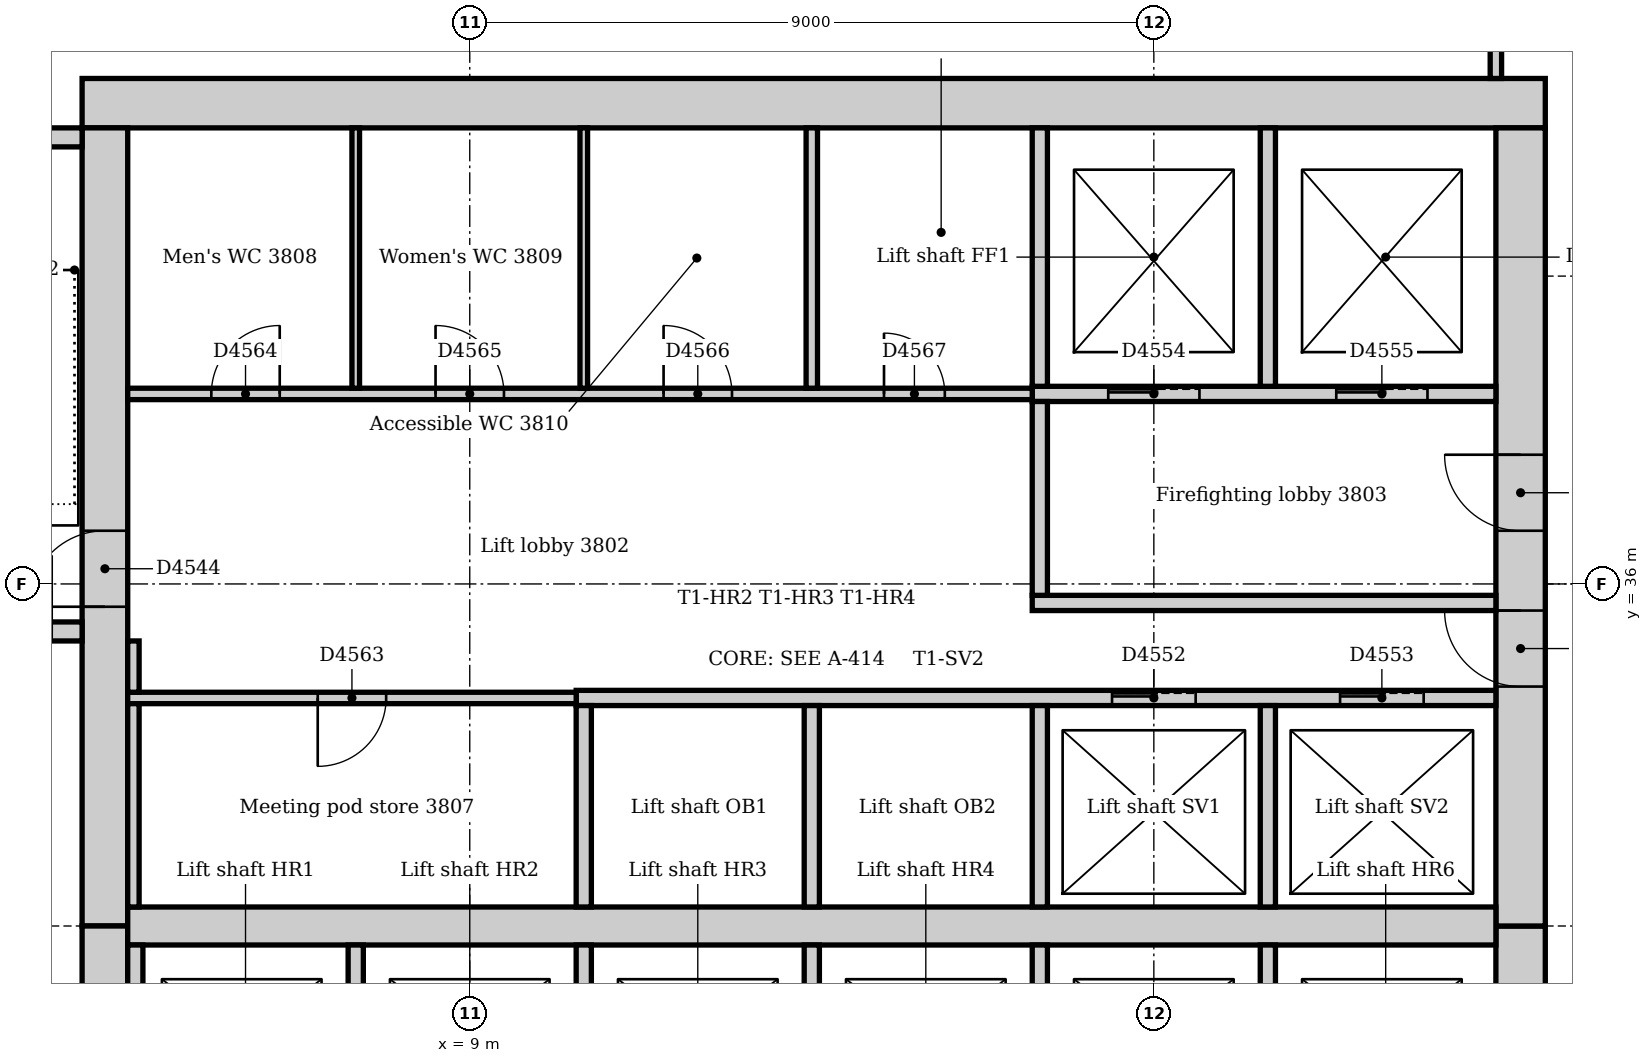
"""IFC4 building model, lengths in metres.
Left out: names, types, materials, properties, quantities, classifications, styles, units other than length and angle.
Written with IfcOpenShell. Run it as: python <this file> out.ifc"""

import sys

from ifc_helpers import new_model, si_unit, direction, frame, frame_2d, origin, place, context, subcontext, project, spatial, rectangle, extrude, element, fill, save


model = new_model("IFC4")
c1 = context("Model", 3, precision=1e-05, world=origin(), true_north=direction((0.0, 1.0)))
c2 = subcontext(c1, "Body", "Model", "MODEL_VIEW")
j1 = project(units=[si_unit("LENGTHUNIT", "METRE"), si_unit("PLANEANGLEUNIT", "RADIAN")], contexts=[c1])
p1 = place(None, origin())
s1 = spatial("IfcSite", under=j1, at=p1, CompositionType="ELEMENT")
p2 = place(p1, origin())
s2 = spatial("IfcBuilding", under=s1, at=p2, CompositionType="ELEMENT")
p3 = place(p2, frame((0.0, 0.0, 161.0)))
s3 = spatial("IfcBuildingStorey", under=s2, at=p3, CompositionType="ELEMENT", Elevation=161.0)
p4 = place(p3, frame((23.15, 42.325, 0.0), z_axis=(0.0, 0.0, 1.0), x_axis=(-1.0, 0.0, 0.0)))
e1 = element("IfcWall", 1, at=p4, inside=s3, PredefinedType="SOLIDWALL", context=c2, shape_type="SweptSolid", body=[
    extrude(rectangle(XDim=19.25, YDim=0.65, at=frame_2d((9.625, 0.0))), origin(), (0.0, 0.0, 1.0), 4.0),
])
p5 = place(p3, frame((22.825, 21.0, 0.0), z_axis=(0.0, 0.0, 1.0), x_axis=(0.0, 1.0, 0.0)))
e2 = element("IfcWall", 2, at=p5, inside=s3, PredefinedType="SOLIDWALL", context=c2, shape_type="SweptSolid", body=[
    extrude(rectangle(XDim=10.5, YDim=0.65, at=frame_2d((5.25, 0.0))), origin(), (0.0, 0.0, 1.0), 4.0),
])
p6 = place(p5, frame((4.35, 0.0, 0.0)))
e3 = element("IfcOpeningElement", 3, at=p6, cuts=e2, PredefinedType="OPENING", context=c2, shape_type="SweptSolid", body=[
    extrude(rectangle(XDim=1.8, YDim=2.1, at=frame_2d((0.9, 1.05))), frame((0.0, 0.335, 0.0), z_axis=(0.0, -1.0, 0.0), x_axis=(1.0, 0.0, 0.0)), (0.0, 0.0, 1.0), 0.67),
])
p7 = place(p3, frame((22.825, 31.5, 0.0), z_axis=(0.0, 0.0, 1.0), x_axis=(0.0, 1.0, 0.0)))
e4 = element("IfcWall", 4, at=p7, inside=s3, PredefinedType="SOLIDWALL", context=c2, shape_type="SweptSolid", body=[
    extrude(rectangle(XDim=10.5, YDim=0.65, at=frame_2d((5.25, 0.0))), origin(), (0.0, 0.0, 1.0), 4.0),
])
p8 = place(p7, frame((3.15, 0.0, 0.0)))
e5 = element("IfcOpeningElement", 5, at=p8, cuts=e4, PredefinedType="OPENING", context=c2, shape_type="SweptSolid", body=[
    extrude(rectangle(XDim=1.0, YDim=2.1, at=frame_2d((0.5, 1.05))), frame((0.0, 0.335, 0.0), z_axis=(0.0, -1.0, 0.0), x_axis=(1.0, 0.0, 0.0)), (0.0, 0.0, 1.0), 0.67),
])
p9 = place(p7, frame((5.2, 0.0, 0.0)))
e6 = element("IfcOpeningElement", 6, at=p9, cuts=e4, PredefinedType="OPENING", context=c2, shape_type="SweptSolid", body=[
    extrude(rectangle(XDim=1.0, YDim=2.1, at=frame_2d((0.5, 1.05))), frame((0.0, 0.335, 0.0), z_axis=(0.0, -1.0, 0.0), x_axis=(1.0, 0.0, 0.0)), (0.0, 0.0, 1.0), 0.67),
])
p10 = place(p3, frame((4.2, 42.0, 0.0), z_axis=(0.0, 0.0, 1.0), x_axis=(0.0, -1.0, 0.0)))
e7 = element("IfcWall", 7, at=p10, inside=s3, PredefinedType="SOLIDWALL", context=c2, shape_type="SweptSolid", body=[
    extrude(rectangle(XDim=10.5, YDim=0.6, at=frame_2d((5.25, 0.0))), origin(), (0.0, 0.0, 1.0), 4.0),
])
p11 = place(p10, frame((5.3, 0.0, 0.0)))
e8 = element("IfcOpeningElement", 8, at=p11, cuts=e7, PredefinedType="OPENING", context=c2, shape_type="SweptSolid", body=[
    extrude(rectangle(XDim=1.0, YDim=2.1, at=frame_2d((0.5, 1.05))), frame((0.0, 0.31, 0.0), z_axis=(0.0, -1.0, 0.0), x_axis=(1.0, 0.0, 0.0)), (0.0, 0.0, 1.0), 0.62),
])
p12 = place(p3, frame((4.2, 31.5, 0.0), z_axis=(0.0, 0.0, 1.0), x_axis=(0.0, -1.0, 0.0)))
e9 = element("IfcWall", 9, at=p12, inside=s3, PredefinedType="SOLIDWALL", context=c2, shape_type="SweptSolid", body=[
    extrude(rectangle(XDim=10.5, YDim=0.6, at=frame_2d((5.25, 0.0))), origin(), (0.0, 0.0, 1.0), 4.0),
])
p13 = place(p12, frame((4.25, 0.0, 0.0)))
e10 = element("IfcOpeningElement", 10, at=p13, cuts=e9, PredefinedType="OPENING", context=c2, shape_type="SweptSolid", body=[
    extrude(rectangle(XDim=1.0, YDim=2.1, at=frame_2d((0.5, 1.05))), frame((0.0, 0.31, 0.0), z_axis=(0.0, -1.0, 0.0), x_axis=(1.0, 0.0, 0.0)), (0.0, 0.0, 1.0), 0.62),
])
p14 = place(p3, frame((4.5, 31.5, 0.0), z_axis=(0.0, 0.0, 1.0), x_axis=(1.0, 0.0, 0.0)))
e11 = element("IfcWall", 11, at=p14, inside=s3, PredefinedType="SOLIDWALL", context=c2, shape_type="SweptSolid", body=[
    extrude(rectangle(XDim=18.0, YDim=0.5, at=frame_2d((9.0, 0.0))), origin(), (0.0, 0.0, 1.0), 4.0),
])
p15 = place(p3, frame((0.36, 35.375, 0.0), z_axis=(0.0, 0.0, 1.0), x_axis=(1.0, 0.0, 0.0)))
e12 = element("IfcWall", 12, at=p15, inside=s3, PredefinedType="SOLIDWALL", context=c2, shape_type="SweptSolid", body=[
    extrude(rectangle(XDim=3.54, YDim=0.25, at=frame_2d((1.77, 0.0))), origin(), (0.0, 0.0, 1.0), 4.0),
])
p16 = place(p15, frame((2.14, 0.0, 0.0)))
e13 = element("IfcOpeningElement", 13, at=p16, cuts=e12, PredefinedType="OPENING", context=c2, shape_type="SweptSolid", body=[
    extrude(rectangle(XDim=1.0, YDim=2.1, at=frame_2d((0.5, 1.05))), frame((0.0, 0.135, 0.0), z_axis=(0.0, -1.0, 0.0), x_axis=(1.0, 0.0, 0.0)), (0.0, 0.0, 1.0), 0.27),
])
p17 = place(p3, frame((3.9, 41.875, 0.0), z_axis=(0.0, 0.0, 1.0), x_axis=(-1.0, 0.0, 0.0)))
e14 = element("IfcWall", 14, at=p17, inside=s3, PredefinedType="SOLIDWALL", context=c2, shape_type="SweptSolid", body=[
    extrude(rectangle(XDim=3.54, YDim=0.25, at=frame_2d((1.77, 0.0))), origin(), (0.0, 0.0, 1.0), 4.0),
])
p18 = place(p3, frame((16.4, 35.75, 0.0), z_axis=(0.0, 0.0, 1.0), x_axis=(1.0, 0.0, 0.0)))
e15 = element("IfcWall", 15, at=p18, inside=s3, PredefinedType="PARTITIONING", context=c2, shape_type="SweptSolid", body=[
    extrude(rectangle(XDim=6.1, YDim=0.2, at=frame_2d((3.05, 0.0))), origin(), (0.0, 0.0, 1.0), 3.85),
])
p19 = place(p3, frame((16.4, 38.5, 0.0), z_axis=(0.0, 0.0, 1.0), x_axis=(1.0, 0.0, 0.0)))
e16 = element("IfcWall", 16, at=p19, inside=s3, PredefinedType="PARTITIONING", context=c2, shape_type="SweptSolid", body=[
    extrude(rectangle(XDim=6.1, YDim=0.2, at=frame_2d((3.05, 0.0))), origin(), (0.0, 0.0, 1.0), 3.85),
])
p20 = place(p19, frame((1.0, 0.0, 0.0)))
e17 = element("IfcOpeningElement", 17, at=p20, cuts=e16, PredefinedType="OPENING", context=c2, shape_type="SweptSolid", body=[
    extrude(rectangle(XDim=1.2, YDim=2.1, at=frame_2d((0.6, 1.05))), frame((0.0, 0.11, 0.0), z_axis=(0.0, -1.0, 0.0), x_axis=(1.0, 0.0, 0.0)), (0.0, 0.0, 1.0), 0.22),
])
p21 = place(p19, frame((4.0, 0.0, 0.0)))
e18 = element("IfcOpeningElement", 18, at=p21, cuts=e16, PredefinedType="OPENING", context=c2, shape_type="SweptSolid", body=[
    extrude(rectangle(XDim=1.2, YDim=2.1, at=frame_2d((0.6, 1.05))), frame((0.0, 0.11, 0.0), z_axis=(0.0, -1.0, 0.0), x_axis=(1.0, 0.0, 0.0)), (0.0, 0.0, 1.0), 0.22),
])
p22 = place(p3, frame((16.5, 35.85, 0.0), z_axis=(0.0, 0.0, 1.0), x_axis=(0.0, 1.0, 0.0)))
e19 = element("IfcWall", 19, at=p22, inside=s3, PredefinedType="PARTITIONING", context=c2, shape_type="SweptSolid", body=[
    extrude(rectangle(XDim=2.55, YDim=0.2, at=frame_2d((1.275, 0.0))), origin(), (0.0, 0.0, 1.0), 3.85),
])
p23 = place(p3, frame((10.4, 34.5, 0.0), z_axis=(0.0, 0.0, 1.0), x_axis=(1.0, 0.0, 0.0)))
e20 = element("IfcWall", 20, at=p23, inside=s3, PredefinedType="PARTITIONING", context=c2, shape_type="SweptSolid", body=[
    extrude(rectangle(XDim=12.1, YDim=0.2, at=frame_2d((6.05, 0.0))), origin(), (0.0, 0.0, 1.0), 3.85),
])
p24 = place(p23, frame((7.05, 0.0, 0.0)))
e21 = element("IfcOpeningElement", 21, at=p24, cuts=e20, PredefinedType="OPENING", context=c2, shape_type="SweptSolid", body=[
    extrude(rectangle(XDim=1.1, YDim=2.1, at=frame_2d((0.55, 1.05))), frame((0.0, 0.11, 0.0), z_axis=(0.0, -1.0, 0.0), x_axis=(1.0, 0.0, 0.0)), (0.0, 0.0, 1.0), 0.22),
])
p25 = place(p23, frame((10.05, 0.0, 0.0)))
e22 = element("IfcOpeningElement", 22, at=p25, cuts=e20, PredefinedType="OPENING", context=c2, shape_type="SweptSolid", body=[
    extrude(rectangle(XDim=1.1, YDim=2.1, at=frame_2d((0.55, 1.05))), frame((0.0, 0.11, 0.0), z_axis=(0.0, -1.0, 0.0), x_axis=(1.0, 0.0, 0.0)), (0.0, 0.0, 1.0), 0.22),
])
for number, where, z_axis, x_axis in (
    (23, (10.5, 28.6, 0.0), (0.0, 0.0, 1.0), (0.0, 1.0, 0.0)),
    (24, (10.5, 31.75, 0.0), (0.0, 0.0, 1.0), (0.0, 1.0, 0.0)),
    (25, (13.5, 28.6, 0.0), (0.0, 0.0, 1.0), (0.0, 1.0, 0.0)),
    (26, (13.5, 31.75, 0.0), (0.0, 0.0, 1.0), (0.0, 1.0, 0.0)),
    (27, (16.5, 28.6, 0.0), (0.0, 0.0, 1.0), (0.0, 1.0, 0.0)),
    (28, (16.5, 31.75, 0.0), (0.0, 0.0, 1.0), (0.0, 1.0, 0.0)),
    (29, (19.5, 28.6, 0.0), (0.0, 0.0, 1.0), (0.0, 1.0, 0.0)),
    (30, (19.5, 31.75, 0.0), (0.0, 0.0, 1.0), (0.0, 1.0, 0.0)),
):
    element("IfcWall", number, at=place(p3, frame(where, z_axis=z_axis, x_axis=x_axis)), inside=s3, PredefinedType="PARTITIONING", context=c2, shape_type="SweptSolid", body=[
        extrude(rectangle(XDim=2.65, YDim=0.2, at=frame_2d((1.325, 0.0))), origin(), (0.0, 0.0, 1.0), 3.85),
    ])
for number, where, z_axis, x_axis in (
    (31, (16.5, 38.6, 0.0), (0.0, 0.0, 1.0), (0.0, 1.0, 0.0)),
    (32, (19.5, 38.6, 0.0), (0.0, 0.0, 1.0), (0.0, 1.0, 0.0)),
):
    element("IfcWall", number, at=place(p3, frame(where, z_axis=z_axis, x_axis=x_axis)), inside=s3, PredefinedType="PARTITIONING", context=c2, shape_type="SweptSolid", body=[
        extrude(rectangle(XDim=3.4, YDim=0.2, at=frame_2d((1.7, 0.0))), origin(), (0.0, 0.0, 1.0), 3.85),
    ])
for number, where, z_axis, x_axis in (
    (33, (4.6, 28.6, 0.0), (0.0, 0.0, 1.0), (0.0, 1.0, 0.0)),
    (34, (7.5, 28.6, 0.0), (0.0, 0.0, 1.0), (0.0, 1.0, 0.0)),
):
    element("IfcWall", number, at=place(p3, frame(where, z_axis=z_axis, x_axis=x_axis)), inside=s3, PredefinedType="PARTITIONING", context=c2, shape_type="SweptSolid", body=[
        extrude(rectangle(XDim=2.65, YDim=0.2, at=frame_2d((1.325, 0.0))), origin(), (0.0, 0.0, 1.0), 3.85),
    ])
p26 = place(p3, frame((4.5, 38.5, 0.0), z_axis=(0.0, 0.0, 1.0), x_axis=(1.0, 0.0, 0.0)))
e35 = element("IfcWall", 35, at=p26, inside=s3, PredefinedType="PARTITIONING", context=c2, shape_type="SweptSolid", body=[
    extrude(rectangle(XDim=11.9, YDim=0.15, at=frame_2d((5.95, 0.0))), origin(), (0.0, 0.0, 1.0), 3.85),
])
p27 = place(p26, frame((1.1, 0.0, 0.0)))
e36 = element("IfcOpeningElement", 36, at=p27, cuts=e35, PredefinedType="OPENING", context=c2, shape_type="SweptSolid", body=[
    extrude(rectangle(XDim=0.9, YDim=2.1, at=frame_2d((0.45, 1.05))), frame((0.0, 0.085, 0.0), z_axis=(0.0, -1.0, 0.0), x_axis=(1.0, 0.0, 0.0)), (0.0, 0.0, 1.0), 0.17),
])
p28 = place(p26, frame((4.05, 0.0, 0.0)))
e37 = element("IfcOpeningElement", 37, at=p28, cuts=e35, PredefinedType="OPENING", context=c2, shape_type="SweptSolid", body=[
    extrude(rectangle(XDim=0.9, YDim=2.1, at=frame_2d((0.45, 1.05))), frame((0.0, 0.085, 0.0), z_axis=(0.0, -1.0, 0.0), x_axis=(1.0, 0.0, 0.0)), (0.0, 0.0, 1.0), 0.17),
])
p29 = place(p26, frame((7.05, 0.0, 0.0)))
e38 = element("IfcOpeningElement", 38, at=p29, cuts=e35, PredefinedType="OPENING", context=c2, shape_type="SweptSolid", body=[
    extrude(rectangle(XDim=0.9, YDim=2.1, at=frame_2d((0.45, 1.05))), frame((0.0, 0.085, 0.0), z_axis=(0.0, -1.0, 0.0), x_axis=(1.0, 0.0, 0.0)), (0.0, 0.0, 1.0), 0.17),
])
p30 = place(p26, frame((9.95, 0.0, 0.0)))
e39 = element("IfcOpeningElement", 39, at=p30, cuts=e35, PredefinedType="OPENING", context=c2, shape_type="SweptSolid", body=[
    extrude(rectangle(XDim=0.8, YDim=2.1, at=frame_2d((0.4, 1.05))), frame((0.0, 0.085, 0.0), z_axis=(0.0, -1.0, 0.0), x_axis=(1.0, 0.0, 0.0)), (0.0, 0.0, 1.0), 0.17),
])
p31 = place(p3, frame((4.5, 34.5, 0.0), z_axis=(0.0, 0.0, 1.0), x_axis=(1.0, 0.0, 0.0)))
e40 = element("IfcWall", 40, at=p31, inside=s3, PredefinedType="PARTITIONING", context=c2, shape_type="SweptSolid", body=[
    extrude(rectangle(XDim=5.9, YDim=0.15, at=frame_2d((2.95, 0.0))), origin(), (0.0, 0.0, 1.0), 3.85),
])
p32 = place(p31, frame((2.5, 0.0, 0.0)))
e41 = element("IfcOpeningElement", 41, at=p32, cuts=e40, PredefinedType="OPENING", context=c2, shape_type="SweptSolid", body=[
    extrude(rectangle(XDim=0.9, YDim=2.1, at=frame_2d((0.45, 1.05))), frame((0.0, 0.085, 0.0), z_axis=(0.0, -1.0, 0.0), x_axis=(1.0, 0.0, 0.0)), (0.0, 0.0, 1.0), 0.17),
])
p33 = place(p3, frame((4.575, 34.575, 0.0), z_axis=(0.0, 0.0, 1.0), x_axis=(0.0, 1.0, 0.0)))
e42 = element("IfcWall", 42, at=p33, inside=s3, PredefinedType="PARTITIONING", context=c2, shape_type="SweptSolid", body=[
    extrude(rectangle(XDim=0.675, YDim=0.15, at=frame_2d((0.338, 0.0))), origin(), (0.0, 0.0, 1.0), 3.85),
])
p34 = place(p3, frame((4.575, 31.75, 0.0), z_axis=(0.0, 0.0, 1.0), x_axis=(0.0, 1.0, 0.0)))
e43 = element("IfcWall", 43, at=p34, inside=s3, PredefinedType="PARTITIONING", context=c2, shape_type="SweptSolid", body=[
    extrude(rectangle(XDim=2.675, YDim=0.15, at=frame_2d((1.337, 0.0))), origin(), (0.0, 0.0, 1.0), 3.85),
])
p35 = place(p3, frame((22.5, 42.65, 0.0), z_axis=(0.0, 0.0, 1.0), x_axis=(0.0, 1.0, 0.0)))
e44 = element("IfcWall", 44, at=p35, inside=s3, PredefinedType="PARTITIONING", context=c2, shape_type="SweptSolid", body=[
    extrude(rectangle(XDim=1.825, YDim=0.15, at=frame_2d((0.912, 0.0))), origin(), (0.0, 0.0, 1.0), 3.85),
])
p36 = place(p3, frame((13.5, 38.575, 0.0), z_axis=(0.0, 0.0, 1.0), x_axis=(0.0, 1.0, 0.0)))
e45 = element("IfcWall", 45, at=p36, inside=s3, PredefinedType="PARTITIONING", context=c2, shape_type="SweptSolid", body=[
    extrude(rectangle(XDim=3.425, YDim=0.15, at=frame_2d((1.712, 0.0))), origin(), (0.0, 0.0, 1.0), 3.85),
])
for number, where, z_axis, x_axis in (
    (46, (7.5, 38.575, 0.0), (0.0, 0.0, 1.0), (0.0, 1.0, 0.0)),
    (47, (10.5, 38.575, 0.0), (0.0, 0.0, 1.0), (0.0, 1.0, 0.0)),
):
    element("IfcWall", number, at=place(p3, frame(where, z_axis=z_axis, x_axis=x_axis)), inside=s3, PredefinedType="PARTITIONING", context=c2, shape_type="SweptSolid", body=[
        extrude(rectangle(XDim=3.425, YDim=0.1, at=frame_2d((1.712, 0.0))), origin(), (0.0, 0.0, 1.0), 3.85),
    ])
p37 = place(p11, frame((1.0, 0.0, 0.0), z_axis=(0.0, 0.0, 1.0), x_axis=(-1.0, 0.0, 0.0)))
e48 = element("IfcDoor", 48, at=p37, inside=s3, OperationType="SINGLE_SWING_LEFT", PredefinedType="DOOR", context=c2, shape_type="SweptSolid", body=[
    extrude(rectangle(XDim=1.0, YDim=2.1, at=frame_2d((0.5, 1.05))), frame((0.0, 0.025, 0.0), z_axis=(0.0, -1.0, 0.0), x_axis=(1.0, 0.0, 0.0)), (0.0, 0.0, 1.0), 0.05),
])
fill(e8, e48)
p38 = place(p24, origin())
e49 = element("IfcDoor", 49, at=p38, inside=s3, OperationType="SLIDING_TO_LEFT", PredefinedType="DOOR", context=c2, shape_type="SweptSolid", body=[
    extrude(rectangle(XDim=1.1, YDim=2.1, at=frame_2d((0.55, 1.05))), frame((0.0, 0.025, 0.0), z_axis=(0.0, -1.0, 0.0), x_axis=(1.0, 0.0, 0.0)), (0.0, 0.0, 1.0), 0.05),
])
fill(e21, e49)
p39 = place(p25, origin())
e50 = element("IfcDoor", 50, at=p39, inside=s3, OperationType="SLIDING_TO_LEFT", PredefinedType="DOOR", context=c2, shape_type="SweptSolid", body=[
    extrude(rectangle(XDim=1.1, YDim=2.1, at=frame_2d((0.55, 1.05))), frame((0.0, 0.025, 0.0), z_axis=(0.0, -1.0, 0.0), x_axis=(1.0, 0.0, 0.0)), (0.0, 0.0, 1.0), 0.05),
])
fill(e22, e50)
p40 = place(p20, origin())
e51 = element("IfcDoor", 51, at=p40, inside=s3, OperationType="SLIDING_TO_LEFT", PredefinedType="DOOR", context=c2, shape_type="SweptSolid", body=[
    extrude(rectangle(XDim=1.2, YDim=2.1, at=frame_2d((0.6, 1.05))), frame((0.0, 0.025, 0.0), z_axis=(0.0, -1.0, 0.0), x_axis=(1.0, 0.0, 0.0)), (0.0, 0.0, 1.0), 0.05),
])
fill(e17, e51)
p41 = place(p21, origin())
e52 = element("IfcDoor", 52, at=p41, inside=s3, OperationType="SLIDING_TO_LEFT", PredefinedType="DOOR", context=c2, shape_type="SweptSolid", body=[
    extrude(rectangle(XDim=1.2, YDim=2.1, at=frame_2d((0.6, 1.05))), frame((0.0, 0.025, 0.0), z_axis=(0.0, -1.0, 0.0), x_axis=(1.0, 0.0, 0.0)), (0.0, 0.0, 1.0), 0.05),
])
fill(e18, e52)
p42 = place(p8, origin())
e53 = element("IfcDoor", 53, at=p42, inside=s3, OperationType="SINGLE_SWING_RIGHT", PredefinedType="DOOR", context=c2, shape_type="SweptSolid", body=[
    extrude(rectangle(XDim=1.0, YDim=2.1, at=frame_2d((0.5, 1.05))), frame((0.0, 0.025, 0.0), z_axis=(0.0, -1.0, 0.0), x_axis=(1.0, 0.0, 0.0)), (0.0, 0.0, 1.0), 0.05),
])
fill(e5, e53)
p43 = place(p9, origin())
e54 = element("IfcDoor", 54, at=p43, inside=s3, OperationType="SINGLE_SWING_RIGHT", PredefinedType="DOOR", context=c2, shape_type="SweptSolid", body=[
    extrude(rectangle(XDim=1.0, YDim=2.1, at=frame_2d((0.5, 1.05))), frame((0.0, 0.025, 0.0), z_axis=(0.0, -1.0, 0.0), x_axis=(1.0, 0.0, 0.0)), (0.0, 0.0, 1.0), 0.05),
])
fill(e6, e54)
p44 = place(p32, frame((0.9, 0.0, 0.0), z_axis=(0.0, 0.0, 1.0), x_axis=(-1.0, 0.0, 0.0)))
e55 = element("IfcDoor", 55, at=p44, inside=s3, OperationType="SINGLE_SWING_RIGHT", PredefinedType="DOOR", context=c2, shape_type="SweptSolid", body=[
    extrude(rectangle(XDim=0.9, YDim=2.1, at=frame_2d((0.45, 1.05))), frame((0.0, 0.025, 0.0), z_axis=(0.0, -1.0, 0.0), x_axis=(1.0, 0.0, 0.0)), (0.0, 0.0, 1.0), 0.05),
])
fill(e41, e55)
p45 = place(p27, origin())
e56 = element("IfcDoor", 56, at=p45, inside=s3, OperationType="SINGLE_SWING_RIGHT", PredefinedType="DOOR", context=c2, shape_type="SweptSolid", body=[
    extrude(rectangle(XDim=0.9, YDim=2.1, at=frame_2d((0.45, 1.05))), frame((0.0, 0.025, 0.0), z_axis=(0.0, -1.0, 0.0), x_axis=(1.0, 0.0, 0.0)), (0.0, 0.0, 1.0), 0.05),
])
fill(e36, e56)
p46 = place(p28, origin())
e57 = element("IfcDoor", 57, at=p46, inside=s3, OperationType="SINGLE_SWING_LEFT", PredefinedType="DOOR", context=c2, shape_type="SweptSolid", body=[
    extrude(rectangle(XDim=0.9, YDim=2.1, at=frame_2d((0.45, 1.05))), frame((0.0, 0.025, 0.0), z_axis=(0.0, -1.0, 0.0), x_axis=(1.0, 0.0, 0.0)), (0.0, 0.0, 1.0), 0.05),
])
fill(e37, e57)
p47 = place(p29, origin())
e58 = element("IfcDoor", 58, at=p47, inside=s3, OperationType="SINGLE_SWING_LEFT", PredefinedType="DOOR", context=c2, shape_type="SweptSolid", body=[
    extrude(rectangle(XDim=0.9, YDim=2.1, at=frame_2d((0.45, 1.05))), frame((0.0, 0.025, 0.0), z_axis=(0.0, -1.0, 0.0), x_axis=(1.0, 0.0, 0.0)), (0.0, 0.0, 1.0), 0.05),
])
fill(e38, e58)
p48 = place(p30, origin())
e59 = element("IfcDoor", 59, at=p48, inside=s3, OperationType="SINGLE_SWING_LEFT", PredefinedType="DOOR", context=c2, shape_type="SweptSolid", body=[
    extrude(rectangle(XDim=0.8, YDim=2.1, at=frame_2d((0.4, 1.05))), frame((0.0, 0.025, 0.0), z_axis=(0.0, -1.0, 0.0), x_axis=(1.0, 0.0, 0.0)), (0.0, 0.0, 1.0), 0.05),
])
fill(e39, e59)
save(model, sys.argv[1])
